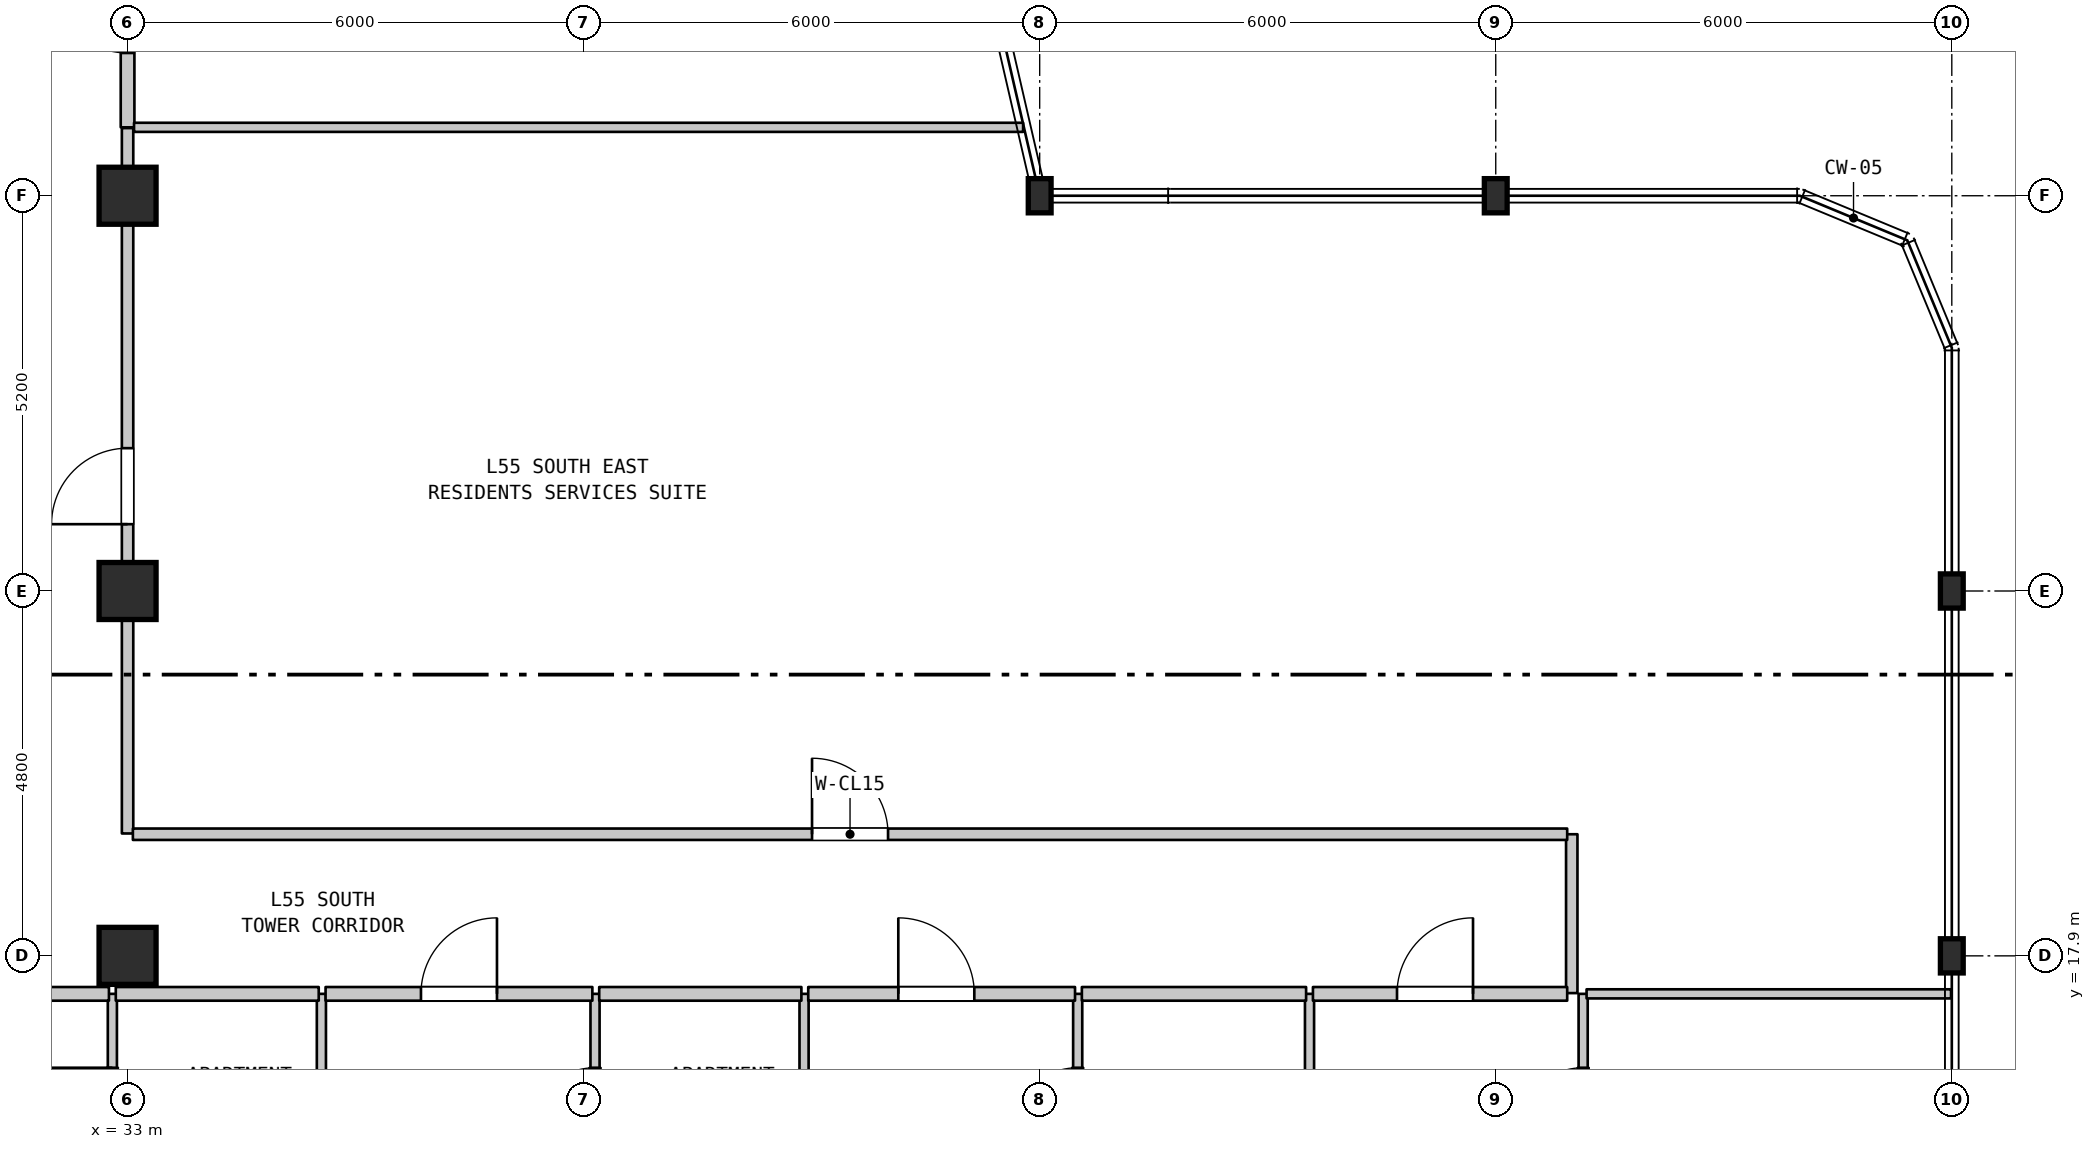
"""IFC4 building model, lengths in metres.
Left out: names, types, materials, properties, quantities, classifications, styles, units other than length and angle.
Written with IfcOpenShell. Run it as: python <this file> out.ifc"""

import sys

from ifc_helpers import new_model, si_unit, direction, frame, frame_2d, origin, origin_2d, place, context, subcontext, project, spatial, rectangle, i_section, extrude, element, fill, save


model = new_model("IFC4")
c1 = context("Model", 3, precision=1e-05, world=origin(), true_north=direction((0.0, 1.0)))
c2 = subcontext(c1, "Body", "Model", "MODEL_VIEW")
j1 = project(units=[si_unit("LENGTHUNIT", "METRE"), si_unit("PLANEANGLEUNIT", "RADIAN")], contexts=[c1])
p1 = place(None, origin())
s1 = spatial("IfcSite", under=j1, at=p1, CompositionType="ELEMENT")
p2 = place(p1, origin())
s2 = spatial("IfcBuilding", under=s1, at=p2, CompositionType="ELEMENT")
p3 = place(p2, frame((0.0, 0.0, 222.8)))
s3 = spatial("IfcBuildingStorey", under=s2, at=p3, CompositionType="ELEMENT", Elevation=222.8)
for number, where, z_axis, x_axis in (
    (1, (33.0, 17.9, 0.0), (0.0, 0.0, 1.0), (1.0, 0.0, 0.0)),
    (2, (33.0, 22.7, 0.0), (0.0, 0.0, 1.0), (1.0, 0.0, 0.0)),
    (3, (33.0, 27.9, 0.0), (0.0, 0.0, 1.0), (1.0, 0.0, 0.0)),
):
    element("IfcColumn", number, at=place(p3, frame(where, z_axis=z_axis, x_axis=x_axis)), inside=s3, PredefinedType="COLUMN", context=c2, shape_type="SweptSolid", body=[
        extrude(rectangle(XDim=0.75, YDim=0.75, at=origin_2d()), origin(), (0.0, 0.0, 1.0), 3.7),
    ])
for number, where, z_axis, x_axis in (
    (4, (45.0, 27.9, 0.0), (0.0, 0.0, 1.0), (1.0, 0.0, 0.0)),
    (5, (51.0, 27.9, 0.0), (0.0, 0.0, 1.0), (1.0, 0.0, 0.0)),
    (6, (57.0, 17.9, 0.0), (0.0, 0.0, 1.0), (1.0, 0.0, 0.0)),
    (7, (57.0, 22.7, 0.0), (0.0, 0.0, 1.0), (1.0, 0.0, 0.0)),
):
    element("IfcColumn", number, at=place(p3, frame(where, z_axis=z_axis, x_axis=x_axis)), inside=s3, PredefinedType="COLUMN", context=c2, shape_type="SweptSolid", body=[
        extrude(i_section(OverallWidth=0.3, OverallDepth=0.45, WebThickness=0.014, FlangeThickness=0.026, FilletRadius=0.027, at=origin_2d()), origin(), (0.0, 0.0, 1.0), 3.7),
    ])
p4 = place(p3, frame((32.8, 14.7, 0.0), z_axis=(0.0, 0.0, 1.0), x_axis=(0.0, 1.0, 0.0)))
e8 = element("IfcWall", 8, at=p4, inside=s3, PredefinedType="PARTITIONING", context=c2, shape_type="SweptSolid", body=[
    extrude(rectangle(XDim=2.7, YDim=0.12, at=frame_2d((1.35, 0.0))), origin(), (0.0, 0.0, 1.0), 3.39),
])
p5 = place(p4, frame((0.828, 0.0, 0.0)))
e9 = element("IfcOpeningElement", 9, at=p5, cuts=e8, PredefinedType="OPENING", context=c2, shape_type="SweptSolid", body=[
    extrude(rectangle(XDim=0.9, YDim=2.1, at=frame_2d((0.45, 1.05))), frame((0.0, 0.07, 0.0), z_axis=(0.0, -1.0, 0.0), x_axis=(1.0, 0.0, 0.0)), (0.0, 0.0, 1.0), 0.14),
])
p6 = place(p3, frame((33.0, 19.51, 0.0), z_axis=(0.0, 0.0, 1.0), x_axis=(0.0, 1.0, 0.0)))
e10 = element("IfcWall", 10, at=p6, inside=s3, PredefinedType="STANDARD", context=c2, shape_type="SweptSolid", body=[
    extrude(rectangle(XDim=8.39, YDim=0.15, at=frame_2d((4.195, 0.0))), origin(), (0.0, 0.0, 1.0), 2.99),
])
p7 = place(p6, frame((4.069, 0.0, 0.0)))
e11 = element("IfcOpeningElement", 11, at=p7, cuts=e10, PredefinedType="OPENING", context=c2, shape_type="SweptSolid", body=[
    extrude(rectangle(XDim=1.0, YDim=2.15, at=frame_2d((0.5, 1.075))), frame((0.0, 0.085, 0.0), z_axis=(0.0, -1.0, 0.0), x_axis=(1.0, 0.0, 0.0)), (0.0, 0.0, 1.0), 0.17),
])
p8 = place(p3, frame((33.0, 28.8, 0.0), z_axis=(0.0, 0.0, 1.0), x_axis=(0.0, 1.0, 0.0)))
e12 = element("IfcWall", 12, at=p8, inside=s3, PredefinedType="STANDARD", context=c2, shape_type="SweptSolid", body=[
    extrude(rectangle(XDim=3.1, YDim=0.18, at=frame_2d((1.55, 0.0))), origin(), (0.0, 0.0, 1.0), 2.89),
])
p9 = place(p8, frame((0.978, 0.0, 0.0)))
e13 = element("IfcOpeningElement", 13, at=p9, cuts=e12, PredefinedType="OPENING", context=c2, shape_type="SweptSolid", body=[
    extrude(rectangle(XDim=1.0, YDim=2.15, at=frame_2d((0.5, 1.075))), frame((0.0, 0.1, 0.0), z_axis=(0.0, -1.0, 0.0), x_axis=(1.0, 0.0, 0.0)), (0.0, 0.0, 1.0), 0.2),
])
p10 = place(p3, frame((35.55, 14.7, 0.0), z_axis=(0.0, 0.0, 1.0), x_axis=(0.0, 1.0, 0.0)))
e14 = element("IfcWall", 14, at=p10, inside=s3, PredefinedType="PARTITIONING", context=c2, shape_type="SweptSolid", body=[
    extrude(rectangle(XDim=2.7, YDim=0.12, at=frame_2d((1.35, 0.0))), origin(), (0.0, 0.0, 1.0), 3.39),
])
p11 = place(p3, frame((39.15, 14.7, 0.0), z_axis=(0.0, 0.0, 1.0), x_axis=(0.0, 1.0, 0.0)))
e15 = element("IfcWall", 15, at=p11, inside=s3, PredefinedType="PARTITIONING", context=c2, shape_type="SweptSolid", body=[
    extrude(rectangle(XDim=2.7, YDim=0.12, at=frame_2d((1.35, 0.0))), origin(), (0.0, 0.0, 1.0), 3.39),
])
p12 = place(p11, frame((0.828, 0.0, 0.0)))
e16 = element("IfcOpeningElement", 16, at=p12, cuts=e15, PredefinedType="OPENING", context=c2, shape_type="SweptSolid", body=[
    extrude(rectangle(XDim=0.9, YDim=2.1, at=frame_2d((0.45, 1.05))), frame((0.0, 0.07, 0.0), z_axis=(0.0, -1.0, 0.0), x_axis=(1.0, 0.0, 0.0)), (0.0, 0.0, 1.0), 0.14),
])
p13 = place(p3, frame((41.9, 14.7, 0.0), z_axis=(0.0, 0.0, 1.0), x_axis=(0.0, 1.0, 0.0)))
e17 = element("IfcWall", 17, at=p13, inside=s3, PredefinedType="PARTITIONING", context=c2, shape_type="SweptSolid", body=[
    extrude(rectangle(XDim=2.7, YDim=0.12, at=frame_2d((1.35, 0.0))), origin(), (0.0, 0.0, 1.0), 3.39),
])
p14 = place(p3, frame((45.5, 14.7, 0.0), z_axis=(0.0, 0.0, 1.0), x_axis=(0.0, 1.0, 0.0)))
e18 = element("IfcWall", 18, at=p14, inside=s3, PredefinedType="PARTITIONING", context=c2, shape_type="SweptSolid", body=[
    extrude(rectangle(XDim=2.7, YDim=0.12, at=frame_2d((1.35, 0.0))), origin(), (0.0, 0.0, 1.0), 3.39),
])
p15 = place(p14, frame((0.828, 0.0, 0.0)))
e19 = element("IfcOpeningElement", 19, at=p15, cuts=e18, PredefinedType="OPENING", context=c2, shape_type="SweptSolid", body=[
    extrude(rectangle(XDim=0.9, YDim=2.1, at=frame_2d((0.45, 1.05))), frame((0.0, 0.07, 0.0), z_axis=(0.0, -1.0, 0.0), x_axis=(1.0, 0.0, 0.0)), (0.0, 0.0, 1.0), 0.14),
])
p16 = place(p3, frame((48.55, 14.7, 0.0), z_axis=(0.0, 0.0, 1.0), x_axis=(0.0, 1.0, 0.0)))
e20 = element("IfcWall", 20, at=p16, inside=s3, PredefinedType="PARTITIONING", context=c2, shape_type="SweptSolid", body=[
    extrude(rectangle(XDim=2.7, YDim=0.12, at=frame_2d((1.35, 0.0))), origin(), (0.0, 0.0, 1.0), 3.39),
])
p17 = place(p3, frame((52.0, 17.41, 0.0), z_axis=(0.0, 0.0, 1.0), x_axis=(0.0, 1.0, 0.0)))
e21 = element("IfcWall", 21, at=p17, inside=s3, PredefinedType="STANDARD", context=c2, shape_type="SweptSolid", body=[
    extrude(rectangle(XDim=2.09, YDim=0.15, at=frame_2d((1.045, 0.0))), origin(), (0.0, 0.0, 1.0), 3.39),
])
p18 = place(p3, frame((52.15, 14.7, 0.0), z_axis=(0.0, 0.0, 1.0), x_axis=(0.0, 1.0, 0.0)))
e22 = element("IfcWall", 22, at=p18, inside=s3, PredefinedType="PARTITIONING", context=c2, shape_type="SweptSolid", body=[
    extrude(rectangle(XDim=2.7, YDim=0.12, at=frame_2d((1.35, 0.0))), origin(), (0.0, 0.0, 1.0), 3.39),
])
p19 = place(p18, frame((0.828, 0.0, 0.0)))
e23 = element("IfcOpeningElement", 23, at=p19, cuts=e22, PredefinedType="OPENING", context=c2, shape_type="SweptSolid", body=[
    extrude(rectangle(XDim=0.9, YDim=2.1, at=frame_2d((0.45, 1.05))), frame((0.0, 0.07, 0.0), z_axis=(0.0, -1.0, 0.0), x_axis=(1.0, 0.0, 0.0)), (0.0, 0.0, 1.0), 0.14),
])
p20 = place(p3, frame((29.245, 17.4, 0.0), z_axis=(0.0, 0.0, 1.0), x_axis=(1.0, 0.0, 0.0)))
e24 = element("IfcWall", 24, at=p20, inside=s3, PredefinedType="STANDARD", context=c2, shape_type="SweptSolid", body=[
    extrude(rectangle(XDim=3.51, YDim=0.18, at=frame_2d((1.755, 0.0))), origin(), (0.0, 0.0, 1.0), 3.39),
])
p21 = place(p20, frame((1.255, 0.0, 0.0)))
e25 = element("IfcOpeningElement", 25, at=p21, cuts=e24, PredefinedType="OPENING", context=c2, shape_type="SweptSolid", body=[
    extrude(rectangle(XDim=1.0, YDim=2.15, at=frame_2d((0.5, 1.075))), frame((0.0, 0.1, 0.0), z_axis=(0.0, -1.0, 0.0), x_axis=(1.0, 0.0, 0.0)), (0.0, 0.0, 1.0), 0.2),
])
p22 = place(p3, frame((32.845, 17.4, 0.0), z_axis=(0.0, 0.0, 1.0), x_axis=(1.0, 0.0, 0.0)))
e26 = element("IfcWall", 26, at=p22, inside=s3, PredefinedType="STANDARD", context=c2, shape_type="SweptSolid", body=[
    extrude(rectangle(XDim=2.67, YDim=0.18, at=frame_2d((1.335, 0.0))), origin(), (0.0, 0.0, 1.0), 3.39),
])
p23 = place(p3, frame((35.605, 17.4, 0.0), z_axis=(0.0, 0.0, 1.0), x_axis=(1.0, 0.0, 0.0)))
e27 = element("IfcWall", 27, at=p23, inside=s3, PredefinedType="STANDARD", context=c2, shape_type="SweptSolid", body=[
    extrude(rectangle(XDim=3.51, YDim=0.18, at=frame_2d((1.755, 0.0))), origin(), (0.0, 0.0, 1.0), 3.39),
])
p24 = place(p23, frame((1.255, 0.0, 0.0)))
e28 = element("IfcOpeningElement", 28, at=p24, cuts=e27, PredefinedType="OPENING", context=c2, shape_type="SweptSolid", body=[
    extrude(rectangle(XDim=1.0, YDim=2.15, at=frame_2d((0.5, 1.075))), frame((0.0, 0.1, 0.0), z_axis=(0.0, -1.0, 0.0), x_axis=(1.0, 0.0, 0.0)), (0.0, 0.0, 1.0), 0.2),
])
p25 = place(p3, frame((39.205, 17.4, 0.0), z_axis=(0.0, 0.0, 1.0), x_axis=(1.0, 0.0, 0.0)))
e29 = element("IfcWall", 29, at=p25, inside=s3, PredefinedType="STANDARD", context=c2, shape_type="SweptSolid", body=[
    extrude(rectangle(XDim=2.66, YDim=0.18, at=frame_2d((1.33, 0.0))), origin(), (0.0, 0.0, 1.0), 3.39),
])
p26 = place(p3, frame((41.955, 17.4, 0.0), z_axis=(0.0, 0.0, 1.0), x_axis=(1.0, 0.0, 0.0)))
e30 = element("IfcWall", 30, at=p26, inside=s3, PredefinedType="STANDARD", context=c2, shape_type="SweptSolid", body=[
    extrude(rectangle(XDim=3.51, YDim=0.18, at=frame_2d((1.755, 0.0))), origin(), (0.0, 0.0, 1.0), 3.39),
])
p27 = place(p26, frame((1.185, 0.0, 0.0)))
e31 = element("IfcOpeningElement", 31, at=p27, cuts=e30, PredefinedType="OPENING", context=c2, shape_type="SweptSolid", body=[
    extrude(rectangle(XDim=1.0, YDim=2.15, at=frame_2d((0.5, 1.075))), frame((0.0, 0.1, 0.0), z_axis=(0.0, -1.0, 0.0), x_axis=(1.0, 0.0, 0.0)), (0.0, 0.0, 1.0), 0.2),
])
p28 = place(p3, frame((45.555, 17.4, 0.0), z_axis=(0.0, 0.0, 1.0), x_axis=(1.0, 0.0, 0.0)))
e32 = element("IfcWall", 32, at=p28, inside=s3, PredefinedType="STANDARD", context=c2, shape_type="SweptSolid", body=[
    extrude(rectangle(XDim=2.95, YDim=0.18, at=frame_2d((1.475, 0.0))), origin(), (0.0, 0.0, 1.0), 3.39),
])
p29 = place(p3, frame((48.595, 17.4, 0.0), z_axis=(0.0, 0.0, 1.0), x_axis=(1.0, 0.0, 0.0)))
e33 = element("IfcWall", 33, at=p29, inside=s3, PredefinedType="STANDARD", context=c2, shape_type="SweptSolid", body=[
    extrude(rectangle(XDim=3.345, YDim=0.18, at=frame_2d((1.672, 0.0))), origin(), (0.0, 0.0, 1.0), 3.39),
])
p30 = place(p29, frame((1.106, 0.0, 0.0)))
e34 = element("IfcOpeningElement", 34, at=p30, cuts=e33, PredefinedType="OPENING", context=c2, shape_type="SweptSolid", body=[
    extrude(rectangle(XDim=1.0, YDim=2.15, at=frame_2d((0.5, 1.075))), frame((0.0, 0.1, 0.0), z_axis=(0.0, -1.0, 0.0), x_axis=(1.0, 0.0, 0.0)), (0.0, 0.0, 1.0), 0.2),
])
p31 = place(p3, frame((52.195, 17.4, 0.0), z_axis=(0.0, 0.0, 1.0), x_axis=(1.0, 0.0, 0.0)))
e35 = element("IfcWall", 35, at=p31, inside=s3, PredefinedType="PARTITIONING", context=c2, shape_type="SweptSolid", body=[
    extrude(rectangle(XDim=4.795, YDim=0.12, at=frame_2d((2.397, 0.0))), origin(), (0.0, 0.0, 1.0), 3.39),
])
p32 = place(p3, frame((33.07, 19.5, 0.0), z_axis=(0.0, 0.0, 1.0), x_axis=(1.0, 0.0, 0.0)))
e36 = element("IfcWall", 36, at=p32, inside=s3, PredefinedType="STANDARD", context=c2, shape_type="SweptSolid", body=[
    extrude(rectangle(XDim=18.87, YDim=0.15, at=frame_2d((9.435, 0.0))), origin(), (0.0, 0.0, 1.0), 3.39),
])
p33 = place(p32, frame((8.935, 0.0, 0.0)))
e37 = element("IfcOpeningElement", 37, at=p33, cuts=e36, PredefinedType="OPENING", context=c2, shape_type="SweptSolid", body=[
    extrude(rectangle(XDim=1.0, YDim=2.15, at=frame_2d((0.5, 1.075))), frame((0.0, 0.085, 0.0), z_axis=(0.0, -1.0, 0.0), x_axis=(1.0, 0.0, 0.0)), (0.0, 0.0, 1.0), 0.17),
])
p34 = place(p3, frame((33.085, 28.8, 0.0), z_axis=(0.0, 0.0, 1.0), x_axis=(1.0, 0.0, 0.0)))
e38 = element("IfcWall", 38, at=p34, inside=s3, PredefinedType="PARTITIONING", context=c2, shape_type="SweptSolid", body=[
    extrude(rectangle(XDim=11.697, YDim=0.12, at=frame_2d((5.849, 0.0))), origin(), (0.0, 0.0, 1.0), 3.39),
])
p35 = place(p3, frame((33.0, 27.9, 0.0), z_axis=(0.0, 0.0, 1.0), x_axis=(0.0, 1.0, 0.0)))
e39 = element("IfcWall", 39, at=p35, inside=s3, PredefinedType="STANDARD", context=c2, shape_type="SweptSolid", body=[
    extrude(rectangle(XDim=0.89, YDim=0.15, at=frame_2d((0.445, 0.0))), origin(), (0.0, 0.0, 1.0), 2.89),
])
p36 = place(p5, origin())
e40 = element("IfcDoor", 40, at=p36, inside=s3, OperationType="SINGLE_SWING_RIGHT", PredefinedType="DOOR", context=c2, shape_type="SweptSolid", body=[
    extrude(rectangle(XDim=0.9, YDim=2.1, at=frame_2d((0.45, 1.05))), frame((0.0, 0.025, 0.0), z_axis=(0.0, -1.0, 0.0), x_axis=(1.0, 0.0, 0.0)), (0.0, 0.0, 1.0), 0.05),
])
fill(e9, e40)
p37 = place(p7, origin())
e41 = element("IfcDoor", 41, at=p37, inside=s3, OperationType="SINGLE_SWING_LEFT", PredefinedType="DOOR", context=c2, shape_type="SweptSolid", body=[
    extrude(rectangle(XDim=1.0, YDim=2.15, at=frame_2d((0.5, 1.075))), frame((0.0, 0.025, 0.0), z_axis=(0.0, -1.0, 0.0), x_axis=(1.0, 0.0, 0.0)), (0.0, 0.0, 1.0), 0.05),
])
fill(e11, e41)
p38 = place(p9, origin())
e42 = element("IfcDoor", 42, at=p38, inside=s3, OperationType="SINGLE_SWING_RIGHT", PredefinedType="DOOR", context=c2, shape_type="SweptSolid", body=[
    extrude(rectangle(XDim=1.0, YDim=2.15, at=frame_2d((0.5, 1.075))), frame((0.0, 0.025, 0.0), z_axis=(0.0, -1.0, 0.0), x_axis=(1.0, 0.0, 0.0)), (0.0, 0.0, 1.0), 0.05),
])
fill(e13, e42)
p39 = place(p12, origin())
e43 = element("IfcDoor", 43, at=p39, inside=s3, OperationType="SINGLE_SWING_LEFT", PredefinedType="DOOR", context=c2, shape_type="SweptSolid", body=[
    extrude(rectangle(XDim=0.9, YDim=2.1, at=frame_2d((0.45, 1.05))), frame((0.0, 0.025, 0.0), z_axis=(0.0, -1.0, 0.0), x_axis=(1.0, 0.0, 0.0)), (0.0, 0.0, 1.0), 0.05),
])
fill(e16, e43)
p40 = place(p15, origin())
e44 = element("IfcDoor", 44, at=p40, inside=s3, OperationType="SINGLE_SWING_LEFT", PredefinedType="DOOR", context=c2, shape_type="SweptSolid", body=[
    extrude(rectangle(XDim=0.9, YDim=2.1, at=frame_2d((0.45, 1.05))), frame((0.0, 0.025, 0.0), z_axis=(0.0, -1.0, 0.0), x_axis=(1.0, 0.0, 0.0)), (0.0, 0.0, 1.0), 0.05),
])
fill(e19, e44)
p41 = place(p19, origin())
e45 = element("IfcDoor", 45, at=p41, inside=s3, OperationType="SINGLE_SWING_LEFT", PredefinedType="DOOR", context=c2, shape_type="SweptSolid", body=[
    extrude(rectangle(XDim=0.9, YDim=2.1, at=frame_2d((0.45, 1.05))), frame((0.0, 0.025, 0.0), z_axis=(0.0, -1.0, 0.0), x_axis=(1.0, 0.0, 0.0)), (0.0, 0.0, 1.0), 0.05),
])
fill(e23, e45)
p42 = place(p24, origin())
e46 = element("IfcDoor", 46, at=p42, inside=s3, OperationType="SINGLE_SWING_RIGHT", PredefinedType="DOOR", context=c2, shape_type="SweptSolid", body=[
    extrude(rectangle(XDim=1.0, YDim=2.15, at=frame_2d((0.5, 1.075))), frame((0.0, 0.025, 0.0), z_axis=(0.0, -1.0, 0.0), x_axis=(1.0, 0.0, 0.0)), (0.0, 0.0, 1.0), 0.05),
])
fill(e28, e46)
p43 = place(p27, origin())
e47 = element("IfcDoor", 47, at=p43, inside=s3, OperationType="SINGLE_SWING_LEFT", PredefinedType="DOOR", context=c2, shape_type="SweptSolid", body=[
    extrude(rectangle(XDim=1.0, YDim=2.15, at=frame_2d((0.5, 1.075))), frame((0.0, 0.025, 0.0), z_axis=(0.0, -1.0, 0.0), x_axis=(1.0, 0.0, 0.0)), (0.0, 0.0, 1.0), 0.05),
])
fill(e31, e47)
p44 = place(p30, origin())
e48 = element("IfcDoor", 48, at=p44, inside=s3, OperationType="SINGLE_SWING_RIGHT", PredefinedType="DOOR", context=c2, shape_type="SweptSolid", body=[
    extrude(rectangle(XDim=1.0, YDim=2.15, at=frame_2d((0.5, 1.075))), frame((0.0, 0.025, 0.0), z_axis=(0.0, -1.0, 0.0), x_axis=(1.0, 0.0, 0.0)), (0.0, 0.0, 1.0), 0.05),
])
fill(e34, e48)
p45 = place(p33, origin())
e49 = element("IfcDoor", 49, at=p45, inside=s3, OperationType="SINGLE_SWING_LEFT", PredefinedType="DOOR", context=c2, shape_type="SweptSolid", body=[
    extrude(rectangle(XDim=1.0, YDim=2.15, at=frame_2d((0.5, 1.075))), frame((0.0, 0.025, 0.0), z_axis=(0.0, -1.0, 0.0), x_axis=(1.0, 0.0, 0.0)), (0.0, 0.0, 1.0), 0.05),
])
fill(e37, e49)
save(model, sys.argv[1])
